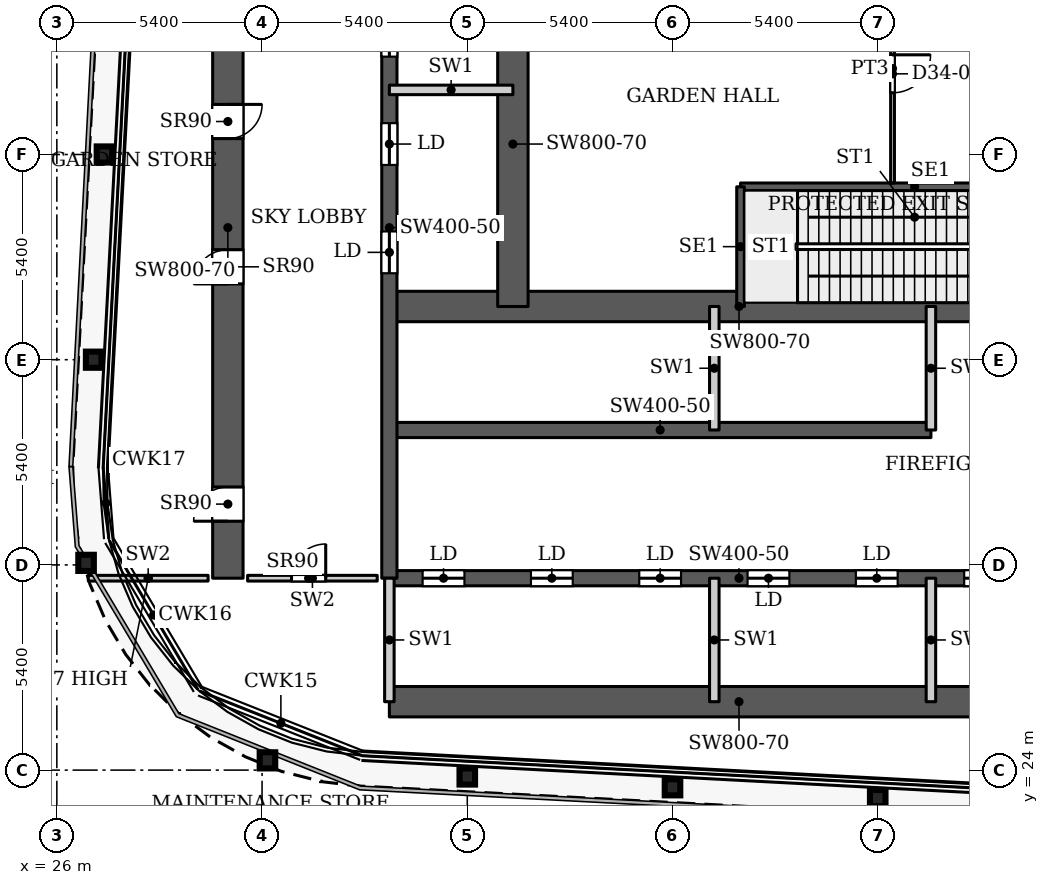
"""IFC4 building model, lengths in metres.
Left out: names, types, materials, properties, quantities, classifications, styles, units other than length and angle.
Written with IfcOpenShell. Run it as: python <this file> out.ifc"""

import sys

from ifc_helpers import new_model, si_unit, direction, frame, frame_2d, origin, origin_2d, place, context, subcontext, project, spatial, rectangle, i_section, extrude, source, transform, mapped, element, fill, save


model = new_model("IFC4")
c1 = context("Model", 3, precision=1e-05, world=origin(), true_north=direction((0.0, 1.0)))
c2 = subcontext(c1, "Body", "Model", "MODEL_VIEW")
j1 = project(units=[si_unit("LENGTHUNIT", "METRE"), si_unit("PLANEANGLEUNIT", "RADIAN")], contexts=[c1])
p1 = place(None, origin())
s1 = spatial("IfcSite", under=j1, at=p1, CompositionType="ELEMENT")
p2 = place(p1, origin())
s2 = spatial("IfcBuilding", under=s1, at=p2, CompositionType="ELEMENT")
p3 = place(p2, frame((0.0, 0.0, 144.8)))
s3 = spatial("IfcBuildingStorey", under=s2, at=p3, CompositionType="ELEMENT", Elevation=144.8)
for number, where, z_axis, x_axis in (
    (1, (47.6, 23.264, 0.0), (0.0, 0.0, 1.0), (1.0, 0.0, 0.0)),
    (2, (42.2, 23.548, 0.0), (0.0, 0.0, 1.0), (1.0, 0.0, 0.0)),
    (3, (36.8, 23.832, 0.0), (0.0, 0.0, 1.0), (1.0, 0.0, 0.0)),
    (4, (31.542, 24.257, 0.0), (0.0, 0.0, 1.0), (1.0, 0.0, 0.0)),
    (5, (26.769, 29.454, 0.0), (0.0, 0.0, 1.0), (1.0, 0.0, 0.0)),
    (6, (26.969, 34.8, 0.0), (0.0, 0.0, 1.0), (1.0, 0.0, 0.0)),
    (7, (27.253, 40.2, 0.0), (0.0, 0.0, 1.0), (1.0, 0.0, 0.0)),
):
    element("IfcColumn", number, at=place(p3, frame(where, z_axis=z_axis, x_axis=x_axis)), inside=s3, PredefinedType="COLUMN", context=c2, shape_type="SweptSolid", body=[
        extrude(i_section(OverallWidth=0.409, OverallDepth=0.425, WebThickness=0.033, FlangeThickness=0.052, FilletRadius=0.013, at=origin_2d()), origin(), (0.0, 0.0, 1.0), 7.8),
    ])
p4 = place(p3, frame((34.75, 25.8, 0.0), z_axis=(0.0, 0.0, 1.0), x_axis=(1.0, 0.0, 0.0)))
e8 = element("IfcWall", 8, at=p4, inside=s3, PredefinedType="SHEAR", context=c2, shape_type="SweptSolid", body=[
    extrude(rectangle(XDim=18.4, YDim=0.8, at=frame_2d((9.2, 0.0))), origin(), (0.0, 0.0, 1.0), 7.8),
])
p5 = place(p3, frame((34.75, 29.05, 0.0), z_axis=(0.0, 0.0, 1.0), x_axis=(1.0, 0.0, 0.0)))
e9 = element("IfcWall", 9, at=p5, inside=s3, PredefinedType="SHEAR", context=c2, shape_type="SweptSolid", body=[
    extrude(rectangle(XDim=18.4, YDim=0.4, at=frame_2d((9.2, 0.0))), origin(), (0.0, 0.0, 1.0), 7.8),
])
p6 = place(p5, frame((0.875, 0.0, 0.0)))
e10 = element("IfcOpeningElement", 10, at=p6, cuts=e9, PredefinedType="OPENING", context=c2, shape_type="SweptSolid", body=[
    extrude(rectangle(XDim=1.1, YDim=2.2, at=frame_2d((0.55, 1.1))), frame((0.0, 0.21, 0.0), z_axis=(0.0, -1.0, 0.0), x_axis=(1.0, 0.0, 0.0)), (0.0, 0.0, 1.0), 0.42),
])
p7 = place(p5, frame((3.725, 0.0, 0.0)))
e11 = element("IfcOpeningElement", 11, at=p7, cuts=e9, PredefinedType="OPENING", context=c2, shape_type="SweptSolid", body=[
    extrude(rectangle(XDim=1.1, YDim=2.2, at=frame_2d((0.55, 1.1))), frame((0.0, 0.21, 0.0), z_axis=(0.0, -1.0, 0.0), x_axis=(1.0, 0.0, 0.0)), (0.0, 0.0, 1.0), 0.42),
])
p8 = place(p5, frame((6.575, 0.0, 0.0)))
e12 = element("IfcOpeningElement", 12, at=p8, cuts=e9, PredefinedType="OPENING", context=c2, shape_type="SweptSolid", body=[
    extrude(rectangle(XDim=1.1, YDim=2.2, at=frame_2d((0.55, 1.1))), frame((0.0, 0.21, 0.0), z_axis=(0.0, -1.0, 0.0), x_axis=(1.0, 0.0, 0.0)), (0.0, 0.0, 1.0), 0.42),
])
p9 = place(p5, frame((9.425, 0.0, 0.0)))
e13 = element("IfcOpeningElement", 13, at=p9, cuts=e9, PredefinedType="OPENING", context=c2, shape_type="SweptSolid", body=[
    extrude(rectangle(XDim=1.1, YDim=2.2, at=frame_2d((0.55, 1.1))), frame((0.0, 0.21, 0.0), z_axis=(0.0, -1.0, 0.0), x_axis=(1.0, 0.0, 0.0)), (0.0, 0.0, 1.0), 0.42),
])
p10 = place(p5, frame((12.275, 0.0, 0.0)))
e14 = element("IfcOpeningElement", 14, at=p10, cuts=e9, PredefinedType="OPENING", context=c2, shape_type="SweptSolid", body=[
    extrude(rectangle(XDim=1.1, YDim=2.2, at=frame_2d((0.55, 1.1))), frame((0.0, 0.21, 0.0), z_axis=(0.0, -1.0, 0.0), x_axis=(1.0, 0.0, 0.0)), (0.0, 0.0, 1.0), 0.42),
])
p11 = place(p5, frame((15.125, 0.0, 0.0)))
e15 = element("IfcOpeningElement", 15, at=p11, cuts=e9, PredefinedType="OPENING", context=c2, shape_type="SweptSolid", body=[
    extrude(rectangle(XDim=1.1, YDim=2.2, at=frame_2d((0.55, 1.1))), frame((0.0, 0.21, 0.0), z_axis=(0.0, -1.0, 0.0), x_axis=(1.0, 0.0, 0.0)), (0.0, 0.0, 1.0), 0.42),
])
p12 = place(p3, frame((34.75, 32.95, 0.0), z_axis=(0.0, 0.0, 1.0), x_axis=(1.0, 0.0, 0.0)))
e16 = element("IfcWall", 16, at=p12, inside=s3, PredefinedType="SHEAR", context=c2, shape_type="SweptSolid", body=[
    extrude(rectangle(XDim=14.25, YDim=0.4, at=frame_2d((7.125, 0.0))), origin(), (0.0, 0.0, 1.0), 7.8),
])
p13 = place(p3, frame((34.75, 36.2, 0.0), z_axis=(0.0, 0.0, 1.0), x_axis=(1.0, 0.0, 0.0)))
e17 = element("IfcWall", 17, at=p13, inside=s3, PredefinedType="SHEAR", context=c2, shape_type="SweptSolid", body=[
    extrude(rectangle(XDim=18.4, YDim=0.8, at=frame_2d((9.2, 0.0))), origin(), (0.0, 0.0, 1.0), 7.8),
])
p14 = place(p13, frame((16.9, 0.0, 0.0)))
e18 = element("IfcOpeningElement", 18, at=p14, cuts=e17, PredefinedType="OPENING", context=c2, shape_type="SweptSolid", body=[
    extrude(rectangle(XDim=1.0, YDim=2.2, at=frame_2d((0.5, 1.1))), frame((0.0, 0.41, 0.0), z_axis=(0.0, -1.0, 0.0), x_axis=(1.0, 0.0, 0.0)), (0.0, 0.0, 1.0), 0.82),
])
p15 = place(p3, frame((34.75, 29.05, 0.0), z_axis=(0.0, 0.0, 1.0), x_axis=(0.0, 1.0, 0.0)))
e19 = element("IfcWall", 19, at=p15, inside=s3, PredefinedType="SHEAR", context=c2, shape_type="SweptSolid", body=[
    extrude(rectangle(XDim=18.45, YDim=0.4, at=frame_2d((9.225, 0.0))), origin(), (0.0, 0.0, 1.0), 7.8),
])
p16 = place(p15, frame((8.025, 0.0, 0.0)))
e20 = element("IfcOpeningElement", 20, at=p16, cuts=e19, PredefinedType="OPENING", context=c2, shape_type="SweptSolid", body=[
    extrude(rectangle(XDim=1.1, YDim=2.2, at=frame_2d((0.55, 1.1))), frame((0.0, 0.21, 0.0), z_axis=(0.0, -1.0, 0.0), x_axis=(1.0, 0.0, 0.0)), (0.0, 0.0, 1.0), 0.42),
])
p17 = place(p15, frame((10.875, 0.0, 0.0)))
e21 = element("IfcOpeningElement", 21, at=p17, cuts=e19, PredefinedType="OPENING", context=c2, shape_type="SweptSolid", body=[
    extrude(rectangle(XDim=1.1, YDim=2.2, at=frame_2d((0.55, 1.1))), frame((0.0, 0.21, 0.0), z_axis=(0.0, -1.0, 0.0), x_axis=(1.0, 0.0, 0.0)), (0.0, 0.0, 1.0), 0.42),
])
p18 = place(p15, frame((13.725, 0.0, 0.0)))
e22 = element("IfcOpeningElement", 22, at=p18, cuts=e19, PredefinedType="OPENING", context=c2, shape_type="SweptSolid", body=[
    extrude(rectangle(XDim=1.1, YDim=2.2, at=frame_2d((0.55, 1.1))), frame((0.0, 0.21, 0.0), z_axis=(0.0, -1.0, 0.0), x_axis=(1.0, 0.0, 0.0)), (0.0, 0.0, 1.0), 0.42),
])
p19 = place(p15, frame((15.95, 0.0, 0.0)))
e23 = element("IfcOpeningElement", 23, at=p19, cuts=e19, PredefinedType="OPENING", context=c2, shape_type="SweptSolid", body=[
    extrude(rectangle(XDim=1.1, YDim=2.2, at=frame_2d((0.55, 1.1))), frame((0.0, 0.21, 0.0), z_axis=(0.0, -1.0, 0.0), x_axis=(1.0, 0.0, 0.0)), (0.0, 0.0, 1.0), 0.42),
])
p20 = place(p3, frame((38.0, 36.2, 0.0), z_axis=(0.0, 0.0, 1.0), x_axis=(0.0, 1.0, 0.0)))
e24 = element("IfcWall", 24, at=p20, inside=s3, PredefinedType="SHEAR", context=c2, shape_type="SweptSolid", body=[
    extrude(rectangle(XDim=8.55, YDim=0.8, at=frame_2d((4.275, 0.0))), origin(), (0.0, 0.0, 1.0), 7.8),
])
p21 = place(p3, frame((30.5, 29.05, 0.0), z_axis=(0.0, 0.0, 1.0), x_axis=(0.0, 1.0, 0.0)))
e25 = element("IfcWall", 25, at=p21, inside=s3, PredefinedType="SHEAR", context=c2, shape_type="SweptSolid", body=[
    extrude(rectangle(XDim=18.45, YDim=0.8, at=frame_2d((9.225, 0.0))), origin(), (0.0, 0.0, 1.0), 7.8),
])
p22 = place(p21, frame((1.5, 0.0, 0.0)))
e26 = element("IfcOpeningElement", 26, at=p22, cuts=e25, PredefinedType="OPENING", context=c2, shape_type="SweptSolid", body=[
    extrude(rectangle(XDim=0.9, YDim=2.2, at=frame_2d((0.45, 1.1))), frame((0.0, 0.41, 0.0), z_axis=(0.0, -1.0, 0.0), x_axis=(1.0, 0.0, 0.0)), (0.0, 0.0, 1.0), 0.82),
])
p23 = place(p21, frame((7.744, 0.0, 0.0)))
e27 = element("IfcOpeningElement", 27, at=p23, cuts=e25, PredefinedType="OPENING", context=c2, shape_type="SweptSolid", body=[
    extrude(rectangle(XDim=0.9, YDim=2.2, at=frame_2d((0.45, 1.1))), frame((0.0, 0.41, 0.0), z_axis=(0.0, -1.0, 0.0), x_axis=(1.0, 0.0, 0.0)), (0.0, 0.0, 1.0), 0.82),
])
p24 = place(p21, frame((11.568, 0.0, 0.0)))
e28 = element("IfcOpeningElement", 28, at=p24, cuts=e25, PredefinedType="OPENING", context=c2, shape_type="SweptSolid", body=[
    extrude(rectangle(XDim=0.9, YDim=2.2, at=frame_2d((0.45, 1.1))), frame((0.0, 0.41, 0.0), z_axis=(0.0, -1.0, 0.0), x_axis=(1.0, 0.0, 0.0)), (0.0, 0.0, 1.0), 0.82),
])
p25 = place(p3, frame((43.99, 39.35, 0.0), z_axis=(0.0, 0.0, 1.0), x_axis=(1.0, 0.0, 0.0)))
e29 = element("IfcWall", 29, at=p25, inside=s3, PredefinedType="SHEAR", context=c2, shape_type="SweptSolid", body=[
    extrude(rectangle(XDim=9.16, YDim=0.2, at=frame_2d((4.58, 0.0))), origin(), (0.0, 0.0, 1.0), 7.8),
])
p26 = place(p3, frame((43.99, 36.2, 0.0), z_axis=(0.0, 0.0, 1.0), x_axis=(0.0, 1.0, 0.0)))
e30 = element("IfcWall", 30, at=p26, inside=s3, PredefinedType="SHEAR", context=c2, shape_type="SweptSolid", body=[
    extrude(rectangle(XDim=3.15, YDim=0.2, at=frame_2d((1.575, 0.0))), origin(), (0.0, 0.0, 1.0), 7.8),
])
for number, where, z_axis, x_axis in (
    (31, (34.75, 25.8, 0.0), (0.0, 0.0, 1.0), (0.0, 1.0, 0.0)),
    (32, (43.3, 25.8, 0.0), (0.0, 0.0, 1.0), (0.0, 1.0, 0.0)),
    (33, (43.3, 32.95, 0.0), (0.0, 0.0, 1.0), (0.0, 1.0, 0.0)),
    (34, (49.0, 25.8, 0.0), (0.0, 0.0, 1.0), (0.0, 1.0, 0.0)),
    (35, (49.0, 32.95, 0.0), (0.0, 0.0, 1.0), (0.0, 1.0, 0.0)),
    (36, (34.75, 41.9, 0.0), (0.0, 0.0, 1.0), (1.0, 0.0, 0.0)),
):
    element("IfcWall", number, at=place(p3, frame(where, z_axis=z_axis, x_axis=x_axis)), inside=s3, PredefinedType="PARTITIONING", context=c2, shape_type="SweptSolid", body=[
        extrude(rectangle(XDim=3.25, YDim=0.25, at=frame_2d((1.625, 0.0))), origin(), (0.0, 0.0, 1.0), 7.8),
    ])
p27 = place(p3, frame((26.828, 29.05, 0.0), z_axis=(0.0, 0.0, 1.0), x_axis=(1.0, 0.0, 0.0)))
e37 = element("IfcWall", 37, at=p27, inside=s3, PredefinedType="PARTITIONING", context=c2, shape_type="SweptSolid", body=[
    extrude(rectangle(XDim=3.152, YDim=0.15, at=frame_2d((1.576, 0.0))), origin(), (0.0, 0.0, 1.0), 7.047),
])
p28 = place(p3, frame((31.02, 29.05, 0.0), z_axis=(0.0, 0.0, 1.0), x_axis=(1.0, 0.0, 0.0)))
e38 = element("IfcWall", 38, at=p28, inside=s3, PredefinedType="PARTITIONING", context=c2, shape_type="SweptSolid", body=[
    extrude(rectangle(XDim=3.41, YDim=0.15, at=frame_2d((1.705, 0.0))), origin(), (0.0, 0.0, 1.0), 7.8),
])
p29 = place(p28, frame((1.155, 0.0, 0.0)))
e39 = element("IfcOpeningElement", 39, at=p29, cuts=e38, PredefinedType="OPENING", context=c2, shape_type="SweptSolid", body=[
    extrude(rectangle(XDim=0.9, YDim=2.2, at=frame_2d((0.45, 1.1))), frame((0.0, 0.085, 0.0), z_axis=(0.0, -1.0, 0.0), x_axis=(1.0, 0.0, 0.0)), (0.0, 0.0, 1.0), 0.17),
])
p30 = place(p3, frame((47.99, 39.449, 0.0), z_axis=(0.0, 0.0, 1.0), x_axis=(0.0, 1.0, 0.0)))
e40 = element("IfcWall", 40, at=p30, inside=s3, PredefinedType="PARTITIONING", context=c2, shape_type="SweptSolid", body=[
    extrude(rectangle(XDim=6.024, YDim=0.1, at=frame_2d((3.012, 0.0))), origin(), (0.0, 0.0, 1.0), 7.5),
])
p31 = place(p30, frame((2.374, 0.0, 0.0)))
e41 = element("IfcOpeningElement", 41, at=p31, cuts=e40, PredefinedType="OPENING", context=c2, shape_type="SweptSolid", body=[
    extrude(rectangle(XDim=1.0, YDim=2.1, at=frame_2d((0.5, 1.05))), frame((0.0, 0.06, 0.0), z_axis=(0.0, -1.0, 0.0), x_axis=(1.0, 0.0, 0.0)), (0.0, 0.0, 1.0), 0.12),
])
m1 = source(origin(), c2, "Body", "SweptSolid", [
    extrude(rectangle(XDim=1.1, YDim=2.2, at=frame_2d((0.55, 1.1))), frame((0.0, 0.025, 0.0), z_axis=(0.0, -1.0, 0.0), x_axis=(1.0, 0.0, 0.0)), (0.0, 0.0, 1.0), 0.05),
])
p32 = place(p6, origin())
e42 = element("IfcDoor", 42, at=p32, inside=s3, OperationType="SLIDING_TO_LEFT", PredefinedType="DOOR", context=c2, shape_type="MappedRepresentation", body=[
    mapped(m1, transform((0.0, 0.0, 0.0), x_axis=(1.0, 0.0, 0.0), y_axis=(0.0, 1.0, 0.0), z_axis=(0.0, 0.0, 1.0), scale=1.0)),
])
fill(e10, e42)
p33 = place(p7, origin())
e43 = element("IfcDoor", 43, at=p33, inside=s3, OperationType="SLIDING_TO_LEFT", PredefinedType="DOOR", context=c2, shape_type="MappedRepresentation", body=[
    mapped(m1, transform((0.0, 0.0, 0.0), x_axis=(1.0, 0.0, 0.0), y_axis=(0.0, 1.0, 0.0), z_axis=(0.0, 0.0, 1.0), scale=1.0)),
])
fill(e11, e43)
p34 = place(p8, origin())
e44 = element("IfcDoor", 44, at=p34, inside=s3, OperationType="SLIDING_TO_LEFT", PredefinedType="DOOR", context=c2, shape_type="MappedRepresentation", body=[
    mapped(m1, transform((0.0, 0.0, 0.0), x_axis=(1.0, 0.0, 0.0), y_axis=(0.0, 1.0, 0.0), z_axis=(0.0, 0.0, 1.0), scale=1.0)),
])
fill(e12, e44)
p35 = place(p9, origin())
e45 = element("IfcDoor", 45, at=p35, inside=s3, OperationType="SLIDING_TO_LEFT", PredefinedType="DOOR", context=c2, shape_type="MappedRepresentation", body=[
    mapped(m1, transform((0.0, 0.0, 0.0), x_axis=(1.0, 0.0, 0.0), y_axis=(0.0, 1.0, 0.0), z_axis=(0.0, 0.0, 1.0), scale=1.0)),
])
fill(e13, e45)
p36 = place(p10, origin())
e46 = element("IfcDoor", 46, at=p36, inside=s3, OperationType="SLIDING_TO_LEFT", PredefinedType="DOOR", context=c2, shape_type="MappedRepresentation", body=[
    mapped(m1, transform((0.0, 0.0, 0.0), x_axis=(1.0, 0.0, 0.0), y_axis=(0.0, 1.0, 0.0), z_axis=(0.0, 0.0, 1.0), scale=1.0)),
])
fill(e14, e46)
p37 = place(p16, origin())
e47 = element("IfcDoor", 47, at=p37, inside=s3, OperationType="SLIDING_TO_LEFT", PredefinedType="DOOR", context=c2, shape_type="MappedRepresentation", body=[
    mapped(m1, transform((0.0, 0.0, 0.0), x_axis=(1.0, 0.0, 0.0), y_axis=(0.0, 1.0, 0.0), z_axis=(0.0, 0.0, 1.0), scale=1.0)),
])
fill(e20, e47)
p38 = place(p17, origin())
e48 = element("IfcDoor", 48, at=p38, inside=s3, OperationType="SLIDING_TO_LEFT", PredefinedType="DOOR", context=c2, shape_type="MappedRepresentation", body=[
    mapped(m1, transform((0.0, 0.0, 0.0), x_axis=(1.0, 0.0, 0.0), y_axis=(0.0, 1.0, 0.0), z_axis=(0.0, 0.0, 1.0), scale=1.0)),
])
fill(e21, e48)
p39 = place(p18, origin())
e49 = element("IfcDoor", 49, at=p39, inside=s3, OperationType="SLIDING_TO_LEFT", PredefinedType="DOOR", context=c2, shape_type="MappedRepresentation", body=[
    mapped(m1, transform((0.0, 0.0, 0.0), x_axis=(1.0, 0.0, 0.0), y_axis=(0.0, 1.0, 0.0), z_axis=(0.0, 0.0, 1.0), scale=1.0)),
])
fill(e22, e49)
p40 = place(p11, origin())
e50 = element("IfcDoor", 50, at=p40, inside=s3, OperationType="SLIDING_TO_LEFT", PredefinedType="DOOR", context=c2, shape_type="MappedRepresentation", body=[
    mapped(m1, transform((0.0, 0.0, 0.0), x_axis=(1.0, 0.0, 0.0), y_axis=(0.0, 1.0, 0.0), z_axis=(0.0, 0.0, 1.0), scale=1.0)),
])
fill(e15, e50)
m2 = source(origin(), c2, "Body", "SweptSolid", [
    extrude(rectangle(XDim=0.9, YDim=2.2, at=frame_2d((0.45, 1.1))), frame((0.0, 0.025, 0.0), z_axis=(0.0, -1.0, 0.0), x_axis=(1.0, 0.0, 0.0)), (0.0, 0.0, 1.0), 0.05),
])
p41 = place(p22, origin())
e51 = element("IfcDoor", 51, at=p41, inside=s3, OperationType="SINGLE_SWING_LEFT", PredefinedType="DOOR", context=c2, shape_type="MappedRepresentation", body=[
    mapped(m2, transform((0.0, 0.0, 0.0), x_axis=(1.0, 0.0, 0.0), y_axis=(0.0, 1.0, 0.0), z_axis=(0.0, 0.0, 1.0), scale=1.0)),
])
fill(e26, e51)
p42 = place(p23, origin())
e52 = element("IfcDoor", 52, at=p42, inside=s3, OperationType="SINGLE_SWING_LEFT", PredefinedType="DOOR", context=c2, shape_type="MappedRepresentation", body=[
    mapped(m2, transform((0.0, 0.0, 0.0), x_axis=(1.0, 0.0, 0.0), y_axis=(0.0, 1.0, 0.0), z_axis=(0.0, 0.0, 1.0), scale=1.0)),
])
fill(e27, e52)
p43 = place(p24, origin())
e53 = element("IfcDoor", 53, at=p43, inside=s3, OperationType="SINGLE_SWING_RIGHT", PredefinedType="DOOR", context=c2, shape_type="MappedRepresentation", body=[
    mapped(m2, transform((0.0, 0.0, 0.0), x_axis=(1.0, 0.0, 0.0), y_axis=(0.0, 1.0, 0.0), z_axis=(0.0, 0.0, 1.0), scale=1.0)),
])
fill(e28, e53)
p44 = place(p29, origin())
e54 = element("IfcDoor", 54, at=p44, inside=s3, OperationType="SINGLE_SWING_LEFT", PredefinedType="DOOR", context=c2, shape_type="MappedRepresentation", body=[
    mapped(m2, transform((0.0, 0.0, 0.0), x_axis=(1.0, 0.0, 0.0), y_axis=(0.0, 1.0, 0.0), z_axis=(0.0, 0.0, 1.0), scale=1.0)),
])
fill(e39, e54)
m3 = source(origin(), c2, "Body", "SweptSolid", [
    extrude(rectangle(XDim=1.0, YDim=2.1, at=frame_2d((0.5, 1.05))), frame((0.0, 0.025, 0.0), z_axis=(0.0, -1.0, 0.0), x_axis=(1.0, 0.0, 0.0)), (0.0, 0.0, 1.0), 0.05),
])
p45 = place(p31, origin())
e55 = element("IfcDoor", 55, at=p45, inside=s3, OperationType="SINGLE_SWING_RIGHT", PredefinedType="DOOR", context=c2, shape_type="MappedRepresentation", body=[
    mapped(m3, transform((0.0, 0.0, 0.0), x_axis=(1.0, 0.0, 0.0), y_axis=(0.0, 1.0, 0.0), z_axis=(0.0, 0.0, 1.0), scale=1.0)),
])
fill(e41, e55)
save(model, sys.argv[1])
